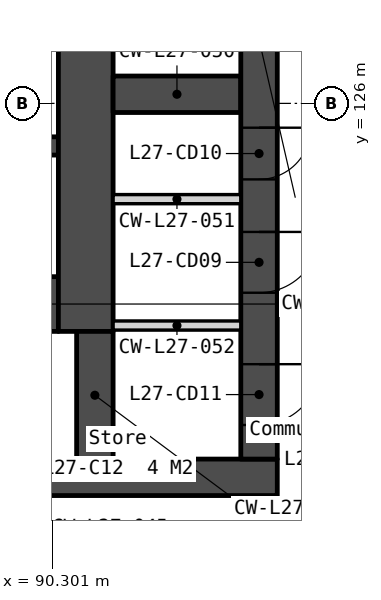
"""IFC4 building model, lengths in metres.
Left out: names, types, materials, properties, quantities, classifications, styles, units other than length and angle.
Written with IfcOpenShell. Run it as: python <this file> out.ifc"""

import sys

from ifc_helpers import new_model, si_unit, direction, frame, frame_2d, origin, place, context, subcontext, project, spatial, polyline, rectangle, outline, extrude, element, fill, save


model = new_model("IFC4")
c1 = context("Model", 3, precision=1e-05, world=origin(), true_north=direction((0.0, 1.0)))
c2 = subcontext(c1, "Body", "Model", "MODEL_VIEW")
j1 = project(units=[si_unit("LENGTHUNIT", "METRE"), si_unit("PLANEANGLEUNIT", "RADIAN")], contexts=[c1])
p1 = place(None, origin())
s1 = spatial("IfcSite", under=j1, at=p1, CompositionType="ELEMENT")
p2 = place(p1, origin())
s2 = spatial("IfcBuilding", under=s1, at=p2, CompositionType="ELEMENT")
p3 = place(p2, frame((0.0, 0.0, 109.8)))
s3 = spatial("IfcBuildingStorey", under=s2, at=p3, CompositionType="ELEMENT", Elevation=109.8)
p4 = place(p3, frame((66.0, 119.85, 0.0), z_axis=(0.0, 0.0, 1.0), x_axis=(1.0, 0.0, 0.0)))
e1 = element("IfcWall", 1, at=p4, inside=s3, PredefinedType="SOLIDWALL", context=c2, shape_type="SweptSolid", body=[
    extrude(rectangle(XDim=28.0, YDim=0.6, at=frame_2d((14.0, 0.0))), origin(), (0.0, 0.0, 1.0), 3.35),
])
p5 = place(p4, frame((6.825, 0.0, 0.0)))
e2 = element("IfcOpeningElement", 2, at=p5, cuts=e1, PredefinedType="OPENING", context=c2, shape_type="SweptSolid", body=[
    extrude(rectangle(XDim=1.8, YDim=2.1, at=frame_2d((0.9, 1.05))), frame((0.0, 0.31, 0.0), z_axis=(0.0, -1.0, 0.0), x_axis=(1.0, 0.0, 0.0)), (0.0, 0.0, 1.0), 0.62),
])
p6 = place(p4, frame((15.85, 0.0, 0.0)))
e3 = element("IfcOpeningElement", 3, at=p6, cuts=e1, PredefinedType="OPENING", context=c2, shape_type="SweptSolid", body=[
    extrude(rectangle(XDim=1.5, YDim=2.1, at=frame_2d((0.75, 1.05))), frame((0.0, 0.31, 0.0), z_axis=(0.0, -1.0, 0.0), x_axis=(1.0, 0.0, 0.0)), (0.0, 0.0, 1.0), 0.62),
])
p7 = place(p4, frame((19.375, 0.0, 0.0)))
e4 = element("IfcOpeningElement", 4, at=p7, cuts=e1, PredefinedType="OPENING", context=c2, shape_type="SweptSolid", body=[
    extrude(rectangle(XDim=1.8, YDim=2.1, at=frame_2d((0.9, 1.05))), frame((0.0, 0.31, 0.0), z_axis=(0.0, -1.0, 0.0), x_axis=(1.0, 0.0, 0.0)), (0.0, 0.0, 1.0), 0.62),
])
p8 = place(p4, frame((4.425, 0.0, 0.0)))
e5 = element("IfcOpeningElement", 5, at=p8, cuts=e1, PredefinedType="OPENING", context=c2, shape_type="SweptSolid", body=[
    extrude(rectangle(XDim=1.0, YDim=2.1, at=frame_2d((0.5, 1.05))), frame((0.0, 0.31, 0.0), z_axis=(0.0, -1.0, 0.0), x_axis=(1.0, 0.0, 0.0)), (0.0, 0.0, 1.0), 0.62),
])
p9 = place(p4, frame((9.783, 0.0, 0.0)))
e6 = element("IfcOpeningElement", 6, at=p9, cuts=e1, PredefinedType="OPENING", context=c2, shape_type="SweptSolid", body=[
    extrude(rectangle(XDim=1.0, YDim=2.1, at=frame_2d((0.5, 1.05))), frame((0.0, 0.31, 0.0), z_axis=(0.0, -1.0, 0.0), x_axis=(1.0, 0.0, 0.0)), (0.0, 0.0, 1.0), 0.62),
])
p10 = place(p4, frame((11.525, 0.0, 0.0)))
e7 = element("IfcOpeningElement", 7, at=p10, cuts=e1, PredefinedType="OPENING", context=c2, shape_type="SweptSolid", body=[
    extrude(rectangle(XDim=1.0, YDim=2.1, at=frame_2d((0.5, 1.05))), frame((0.0, 0.31, 0.0), z_axis=(0.0, -1.0, 0.0), x_axis=(1.0, 0.0, 0.0)), (0.0, 0.0, 1.0), 0.62),
])
p11 = place(p4, frame((13.658, 0.0, 0.0)))
e8 = element("IfcOpeningElement", 8, at=p11, cuts=e1, PredefinedType="OPENING", context=c2, shape_type="SweptSolid", body=[
    extrude(rectangle(XDim=1.0, YDim=2.1, at=frame_2d((0.5, 1.05))), frame((0.0, 0.31, 0.0), z_axis=(0.0, -1.0, 0.0), x_axis=(1.0, 0.0, 0.0)), (0.0, 0.0, 1.0), 0.62),
])
p12 = place(p4, frame((22.575, 0.0, 0.0)))
e9 = element("IfcOpeningElement", 9, at=p12, cuts=e1, PredefinedType="OPENING", context=c2, shape_type="SweptSolid", body=[
    extrude(rectangle(XDim=1.0, YDim=2.1, at=frame_2d((0.5, 1.05))), frame((0.0, 0.31, 0.0), z_axis=(0.0, -1.0, 0.0), x_axis=(1.0, 0.0, 0.0)), (0.0, 0.0, 1.0), 0.62),
])
p13 = place(p3, frame((87.85, 125.3, 0.0), z_axis=(0.0, 0.0, 1.0), x_axis=(1.0, 0.0, 0.0)))
e10 = element("IfcWall", 10, at=p13, inside=s3, PredefinedType="SOLIDWALL", context=c2, shape_type="SweptSolid", body=[
    extrude(rectangle(XDim=2.55, YDim=0.3, at=frame_2d((1.275, 0.0))), origin(), (0.0, 0.0, 1.0), 3.35),
])
p14 = place(p3, frame((87.85, 122.7, 0.0), z_axis=(0.0, 0.0, 1.0), x_axis=(1.0, 0.0, 0.0)))
e11 = element("IfcWall", 11, at=p14, inside=s3, PredefinedType="SOLIDWALL", context=c2, shape_type="SweptSolid", body=[
    extrude(rectangle(XDim=2.55, YDim=0.9, at=frame_2d((1.275, 0.0))), origin(), (0.0, 0.0, 1.0), 3.35),
])
p15 = place(p3, frame((90.85, 133.95, 0.0), z_axis=(0.0, 0.0, 1.0), x_axis=(0.0, -1.0, 0.0)))
e12 = element("IfcWall", 12, at=p15, inside=s3, PredefinedType="SOLIDWALL", context=c2, shape_type="SweptSolid", body=[
    extrude(rectangle(XDim=11.7, YDim=0.9, at=frame_2d((5.85, 0.0))), origin(), (0.0, 0.0, 1.0), 3.35),
])
p16 = place(p3, frame((91.0, 122.25, 0.0), z_axis=(0.0, 0.0, 1.0), x_axis=(0.0, -1.0, 0.0)))
e13 = element("IfcWall", 13, at=p16, inside=s3, PredefinedType="SOLIDWALL", context=c2, shape_type="SweptSolid", body=[
    extrude(rectangle(XDim=2.1, YDim=0.6, at=frame_2d((1.05, 0.0))), origin(), (0.0, 0.0, 1.0), 3.35),
])
p17 = place(p3, frame((91.3, 126.15, 0.0), z_axis=(0.0, 0.0, 1.0), x_axis=(1.0, 0.0, 0.0)))
e14 = element("IfcWall", 14, at=p17, inside=s3, PredefinedType="SOLIDWALL", context=c2, shape_type="SweptSolid", body=[
    extrude(rectangle(XDim=2.1, YDim=0.6, at=frame_2d((1.05, 0.0))), origin(), (0.0, 0.0, 1.0), 3.35),
])
for number, where, z_axis, x_axis in (
    (15, (91.3, 124.425, 0.0), (0.0, 0.0, 1.0), (1.0, 0.0, 0.0)),
    (16, (91.3, 122.346, 0.0), (0.0, 0.0, 1.0), (1.0, 0.0, 0.0)),
):
    element("IfcWall", number, at=place(p3, frame(where, z_axis=z_axis, x_axis=x_axis)), inside=s3, PredefinedType="PARTITIONING", context=c2, shape_type="SweptSolid", body=[
        extrude(rectangle(XDim=2.1, YDim=0.15, at=frame_2d((1.05, 0.0))), origin(), (0.0, 0.0, 1.0), 3.35),
    ])
p18 = place(p3, frame((93.7, 133.95, 0.0), z_axis=(0.0, 0.0, 1.0), x_axis=(0.0, -1.0, 0.0)))
e17 = element("IfcWall", 17, at=p18, inside=s3, PredefinedType="SOLIDWALL", context=c2, shape_type="SweptSolid", body=[
    extrude(rectangle(XDim=13.8, YDim=0.6, at=frame_2d((6.9, 0.0))), origin(), (0.0, 0.0, 1.0), 3.35),
])
p19 = place(p18, frame((0.6, 0.0, 0.0)))
e18 = element("IfcOpeningElement", 18, at=p19, cuts=e17, PredefinedType="OPENING", context=c2, shape_type="SweptSolid", body=[
    extrude(rectangle(XDim=1.1, YDim=2.1, at=frame_2d((0.55, 1.05))), frame((0.0, 0.31, 0.0), z_axis=(0.0, -1.0, 0.0), x_axis=(1.0, 0.0, 0.0)), (0.0, 0.0, 1.0), 0.62),
])
p20 = place(p18, frame((10.064, 0.0, 0.0)))
e19 = element("IfcOpeningElement", 19, at=p20, cuts=e17, PredefinedType="OPENING", context=c2, shape_type="SweptSolid", body=[
    extrude(rectangle(XDim=1.0, YDim=2.1, at=frame_2d((0.5, 1.05))), frame((0.0, 0.31, 0.0), z_axis=(0.0, -1.0, 0.0), x_axis=(1.0, 0.0, 0.0)), (0.0, 0.0, 1.0), 0.62),
])
p21 = place(p18, frame((8.35, 0.0, 0.0)))
e20 = element("IfcOpeningElement", 20, at=p21, cuts=e17, PredefinedType="OPENING", context=c2, shape_type="SweptSolid", body=[
    extrude(rectangle(XDim=0.85, YDim=2.1, at=frame_2d((0.425, 1.05))), frame((0.0, 0.31, 0.0), z_axis=(0.0, -1.0, 0.0), x_axis=(1.0, 0.0, 0.0)), (0.0, 0.0, 1.0), 0.62),
])
p22 = place(p18, frame((12.239, 0.0, 0.0)))
e21 = element("IfcOpeningElement", 21, at=p22, cuts=e17, PredefinedType="OPENING", context=c2, shape_type="SweptSolid", body=[
    extrude(rectangle(XDim=1.0, YDim=2.1, at=frame_2d((0.5, 1.05))), frame((0.0, 0.31, 0.0), z_axis=(0.0, -1.0, 0.0), x_axis=(1.0, 0.0, 0.0)), (0.0, 0.0, 1.0), 0.62),
])
p23 = place(p3, frame((82.605, 93.333, -0.15), z_axis=(0.0, 0.0, 1.0), x_axis=(0.500000478905, 0.866025127289, 0.0)))
e22 = element("IfcWall", 22, at=p23, inside=s3, PredefinedType="SOLIDWALL", context=c2, shape_type="SweptSolid", body=[
    extrude(outline(polyline([(42.643, 0.0), (42.643, 3.5), (0.0, 3.5), (0.0, 0.0), (42.643, 0.0)])), frame((0.0, 0.225, 0.0), z_axis=(0.0, -1.0, 0.0), x_axis=(1.0, 0.0, 0.0)), (0.0, 0.0, 1.0), 0.45),
])
p24 = place(p23, frame((2.814, 0.0, 1.05)))
e23 = element("IfcOpeningElement", 23, at=p24, cuts=e22, PredefinedType="OPENING", context=c2, shape_type="SweptSolid", body=[
    extrude(rectangle(XDim=1.2, YDim=1.5, at=frame_2d((0.6, 0.75))), frame((0.0, 0.235, 0.0), z_axis=(0.0, -1.0, 0.0), x_axis=(1.0, 0.0, 0.0)), (0.0, 0.0, 1.0), 0.47),
])
p25 = place(p23, frame((4.514, 0.0, 1.05)))
e24 = element("IfcOpeningElement", 24, at=p25, cuts=e22, PredefinedType="OPENING", context=c2, shape_type="SweptSolid", body=[
    extrude(rectangle(XDim=1.2, YDim=1.5, at=frame_2d((0.6, 0.75))), frame((0.0, 0.235, 0.0), z_axis=(0.0, -1.0, 0.0), x_axis=(1.0, 0.0, 0.0)), (0.0, 0.0, 1.0), 0.47),
])
p26 = place(p23, frame((11.343, 0.0, 1.05)))
e25 = element("IfcOpeningElement", 25, at=p26, cuts=e22, PredefinedType="OPENING", context=c2, shape_type="SweptSolid", body=[
    extrude(rectangle(XDim=1.2, YDim=1.5, at=frame_2d((0.6, 0.75))), frame((0.0, 0.235, 0.0), z_axis=(0.0, -1.0, 0.0), x_axis=(1.0, 0.0, 0.0)), (0.0, 0.0, 1.0), 0.47),
])
p27 = place(p23, frame((13.043, 0.0, 1.05)))
e26 = element("IfcOpeningElement", 26, at=p27, cuts=e22, PredefinedType="OPENING", context=c2, shape_type="SweptSolid", body=[
    extrude(rectangle(XDim=1.2, YDim=1.5, at=frame_2d((0.6, 0.75))), frame((0.0, 0.235, 0.0), z_axis=(0.0, -1.0, 0.0), x_axis=(1.0, 0.0, 0.0)), (0.0, 0.0, 1.0), 0.47),
])
p28 = place(p23, frame((19.872, 0.0, 1.05)))
e27 = element("IfcOpeningElement", 27, at=p28, cuts=e22, PredefinedType="OPENING", context=c2, shape_type="SweptSolid", body=[
    extrude(rectangle(XDim=1.2, YDim=1.5, at=frame_2d((0.6, 0.75))), frame((0.0, 0.235, 0.0), z_axis=(0.0, -1.0, 0.0), x_axis=(1.0, 0.0, 0.0)), (0.0, 0.0, 1.0), 0.47),
])
p29 = place(p23, frame((21.572, 0.0, 1.05)))
e28 = element("IfcOpeningElement", 28, at=p29, cuts=e22, PredefinedType="OPENING", context=c2, shape_type="SweptSolid", body=[
    extrude(rectangle(XDim=1.2, YDim=1.5, at=frame_2d((0.6, 0.75))), frame((0.0, 0.235, 0.0), z_axis=(0.0, -1.0, 0.0), x_axis=(1.0, 0.0, 0.0)), (0.0, 0.0, 1.0), 0.47),
])
p30 = place(p23, frame((28.4, 0.0, 1.05)))
e29 = element("IfcOpeningElement", 29, at=p30, cuts=e22, PredefinedType="OPENING", context=c2, shape_type="SweptSolid", body=[
    extrude(rectangle(XDim=1.2, YDim=1.5, at=frame_2d((0.6, 0.75))), frame((0.0, 0.235, 0.0), z_axis=(0.0, -1.0, 0.0), x_axis=(1.0, 0.0, 0.0)), (0.0, 0.0, 1.0), 0.47),
])
p31 = place(p23, frame((30.1, 0.0, 1.05)))
e30 = element("IfcOpeningElement", 30, at=p31, cuts=e22, PredefinedType="OPENING", context=c2, shape_type="SweptSolid", body=[
    extrude(rectangle(XDim=1.2, YDim=1.5, at=frame_2d((0.6, 0.75))), frame((0.0, 0.235, 0.0), z_axis=(0.0, -1.0, 0.0), x_axis=(1.0, 0.0, 0.0)), (0.0, 0.0, 1.0), 0.47),
])
p32 = place(p23, frame((36.929, 0.0, 1.05)))
e31 = element("IfcOpeningElement", 31, at=p32, cuts=e22, PredefinedType="OPENING", context=c2, shape_type="SweptSolid", body=[
    extrude(rectangle(XDim=1.2, YDim=1.5, at=frame_2d((0.6, 0.75))), frame((0.0, 0.235, 0.0), z_axis=(0.0, -1.0, 0.0), x_axis=(1.0, 0.0, 0.0)), (0.0, 0.0, 1.0), 0.47),
])
p33 = place(p23, frame((38.629, 0.0, 1.05)))
e32 = element("IfcOpeningElement", 32, at=p33, cuts=e22, PredefinedType="OPENING", context=c2, shape_type="SweptSolid", body=[
    extrude(rectangle(XDim=1.2, YDim=1.5, at=frame_2d((0.6, 0.75))), frame((0.0, 0.235, 0.0), z_axis=(0.0, -1.0, 0.0), x_axis=(1.0, 0.0, 0.0)), (0.0, 0.0, 1.0), 0.47),
])
p34 = place(p20, origin())
e33 = element("IfcDoor", 33, at=p34, inside=s3, OperationType="SINGLE_SWING_LEFT", PredefinedType="DOOR", context=c2, shape_type="SweptSolid", body=[
    extrude(rectangle(XDim=1.0, YDim=2.1, at=frame_2d((0.5, 1.05))), frame((0.0, 0.025, 0.0), z_axis=(0.0, -1.0, 0.0), x_axis=(1.0, 0.0, 0.0)), (0.0, 0.0, 1.0), 0.05),
])
fill(e19, e33)
p35 = place(p21, origin())
e34 = element("IfcDoor", 34, at=p35, inside=s3, OperationType="SINGLE_SWING_LEFT", PredefinedType="DOOR", context=c2, shape_type="SweptSolid", body=[
    extrude(rectangle(XDim=0.85, YDim=2.1, at=frame_2d((0.425, 1.05))), frame((0.0, 0.025, 0.0), z_axis=(0.0, -1.0, 0.0), x_axis=(1.0, 0.0, 0.0)), (0.0, 0.0, 1.0), 0.05),
])
fill(e20, e34)
p36 = place(p22, origin())
e35 = element("IfcDoor", 35, at=p36, inside=s3, OperationType="SINGLE_SWING_LEFT", PredefinedType="DOOR", context=c2, shape_type="SweptSolid", body=[
    extrude(rectangle(XDim=1.0, YDim=2.1, at=frame_2d((0.5, 1.05))), frame((0.0, 0.025, 0.0), z_axis=(0.0, -1.0, 0.0), x_axis=(1.0, 0.0, 0.0)), (0.0, 0.0, 1.0), 0.05),
])
fill(e21, e35)
save(model, sys.argv[1])
